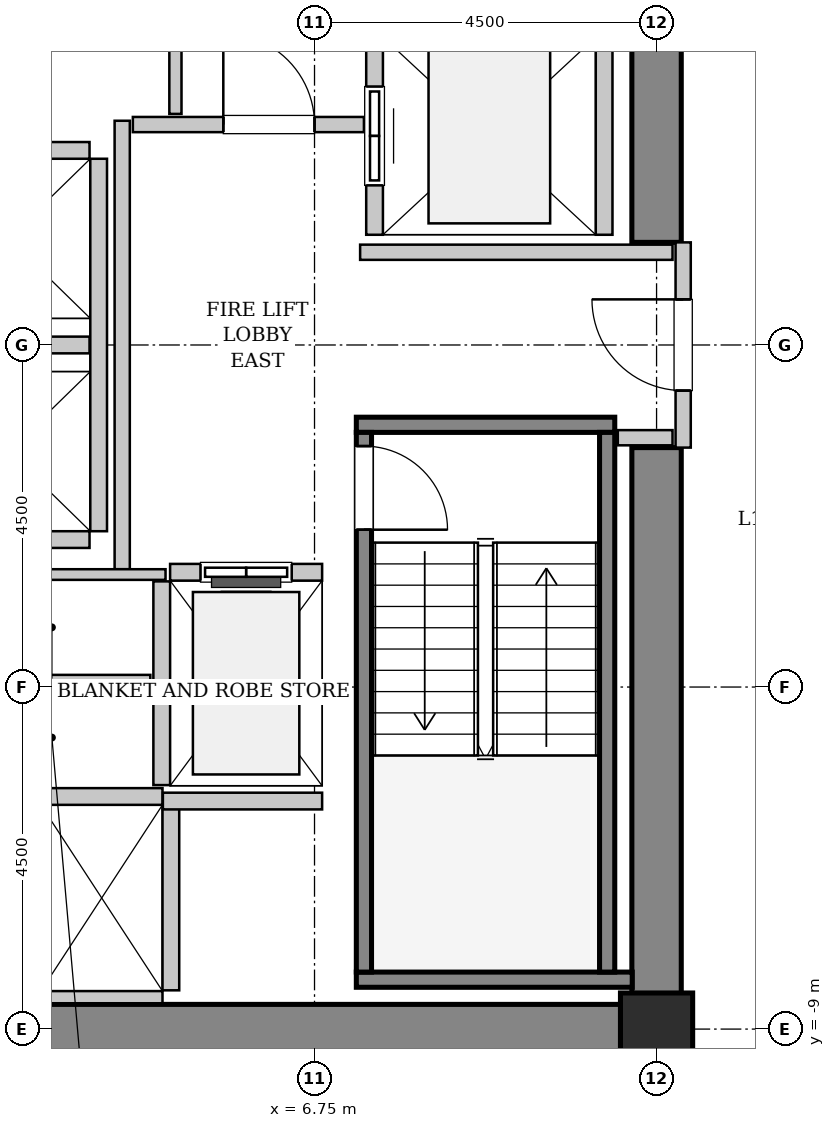
"""IFC4 building model, lengths in metres.
Left out: names, types, materials, properties, quantities, classifications, styles, units other than length and angle.
Written with IfcOpenShell. Run it as: python <this file> out.ifc"""

import sys

from ifc_helpers import new_model, si_unit, direction, frame, frame_2d, origin, origin_2d, place, context, subcontext, project, spatial, rectangle, hollow_rectangle, extrude, source, transform, mapped, element, fill, save


model = new_model("IFC4")
c1 = context("Model", 3, precision=1e-05, world=origin(), true_north=direction((0.0, 1.0)))
c2 = subcontext(c1, "Body", "Model", "MODEL_VIEW")
j1 = project(units=[si_unit("LENGTHUNIT", "METRE"), si_unit("PLANEANGLEUNIT", "RADIAN")], contexts=[c1])
p1 = place(None, origin())
s1 = spatial("IfcSite", under=j1, at=p1, CompositionType="ELEMENT")
p2 = place(p1, origin())
s2 = spatial("IfcBuilding", under=s1, at=p2, CompositionType="ELEMENT")
p3 = place(p2, frame((0.0, 0.0, 59.6)))
s3 = spatial("IfcBuildingStorey", under=s2, at=p3, CompositionType="ELEMENT", Elevation=59.6)
m1 = source(origin(), c2, "Body", "SweptSolid", [
    extrude(rectangle(XDim=10.025, YDim=0.65, at=frame_2d((5.012, 0.0))), origin(), (0.0, 0.0, 1.0), 3.8),
])
p4 = place(p3, frame((1.55, -9.0, 0.0), z_axis=(0.0, 0.0, 1.0), x_axis=(1.0, 0.0, 0.0)))
e1 = element("IfcWall", 1, at=p4, inside=s3, PredefinedType="SHEAR", context=c2, shape_type="MappedRepresentation", body=[
    mapped(m1, transform((0.0, 0.0, 0.0), x_axis=(1.0, 0.0, 0.0), y_axis=(0.0, 1.0, 0.0), z_axis=(0.0, 0.0, 1.0), scale=1.0)),
])
m2 = source(origin(), c2, "Body", "SweptSolid", [
    extrude(rectangle(XDim=7.325, YDim=0.65, at=frame_2d((3.663, 0.0))), origin(), (0.0, 0.0, 1.0), 3.8),
])
for number, where, z_axis, x_axis in (
    (2, (11.25, -8.675, 0.0), (0.0, 0.0, 1.0), (0.0, 1.0, 0.0)),
    (3, (11.25, 1.35, 0.0), (0.0, 0.0, 1.0), (0.0, 1.0, 0.0)),
):
    element("IfcWall", number, at=place(p3, frame(where, z_axis=z_axis, x_axis=x_axis)), inside=s3, PredefinedType="SHEAR", context=c2, shape_type="MappedRepresentation", body=[
        mapped(m2, transform((0.0, 0.0, 0.0), x_axis=(1.0, 0.0, 0.0), y_axis=(0.0, 1.0, 0.0), z_axis=(0.0, 0.0, 1.0), scale=1.0)),
    ])
m3 = source(origin(), c2, "Body", "SweptSolid", [
    extrude(hollow_rectangle(XDim=0.95, YDim=0.95, WallThickness=0.045, InnerFilletRadius=0.045, OuterFilletRadius=0.09, at=origin_2d()), origin(), (0.0, 0.0, 1.0), 3.8),
])
p5 = place(p3, frame((11.25, -9.0, 0.0), z_axis=(0.0, 0.0, 1.0), x_axis=(1.0, 0.0, 0.0)))
e4 = element("IfcColumn", 4, at=p5, inside=s3, PredefinedType="COLUMN", context=c2, shape_type="MappedRepresentation", body=[
    mapped(m3, transform((0.0, 0.0, 0.0), x_axis=(1.0, 0.0, 0.0), y_axis=(0.0, 1.0, 0.0), z_axis=(0.0, 0.0, 1.0), scale=1.0)),
])
m4 = source(origin(), c2, "Body", "SweptSolid", [
    extrude(rectangle(XDim=3.4, YDim=0.2, at=frame_2d((1.7, 0.0))), origin(), (0.0, 0.0, 1.0), 3.8),
])
p6 = place(p3, frame((7.3, -1.05, 0.0), z_axis=(0.0, 0.0, 1.0), x_axis=(1.0, 0.0, 0.0)))
e5 = element("IfcWall", 5, at=p6, inside=s3, PredefinedType="SOLIDWALL", context=c2, shape_type="MappedRepresentation", body=[
    mapped(m4, transform((0.0, 0.0, 0.0), x_axis=(1.0, 0.0, 0.0), y_axis=(0.0, 1.0, 0.0), z_axis=(0.0, 0.0, 1.0), scale=1.0)),
])
m5 = source(origin(), c2, "Body", "SweptSolid", [
    extrude(rectangle(XDim=3.63, YDim=0.2, at=frame_2d((1.815, 0.0))), origin(), (0.0, 0.0, 1.0), 3.8),
])
p7 = place(p3, frame((7.3, -8.35, 0.0), z_axis=(0.0, 0.0, 1.0), x_axis=(1.0, 0.0, 0.0)))
e6 = element("IfcWall", 6, at=p7, inside=s3, PredefinedType="SOLIDWALL", context=c2, shape_type="MappedRepresentation", body=[
    mapped(m5, transform((0.0, 0.0, 0.0), x_axis=(1.0, 0.0, 0.0), y_axis=(0.0, 1.0, 0.0), z_axis=(0.0, 0.0, 1.0), scale=1.0)),
])
m6 = source(origin(), c2, "Body", "SweptSolid", [
    extrude(rectangle(XDim=7.1, YDim=0.2, at=frame_2d((3.55, 0.0))), origin(), (0.0, 0.0, 1.0), 3.8),
])
p8 = place(p3, frame((7.4, -1.15, 0.0), z_axis=(0.0, 0.0, 1.0), x_axis=(0.0, -1.0, 0.0)))
e7 = element("IfcWall", 7, at=p8, inside=s3, PredefinedType="SOLIDWALL", context=c2, shape_type="MappedRepresentation", body=[
    mapped(m6, transform((0.0, 0.0, 0.0), x_axis=(1.0, 0.0, 0.0), y_axis=(0.0, 1.0, 0.0), z_axis=(0.0, 0.0, 1.0), scale=1.0)),
])
p9 = place(p8, frame((0.18, 0.0, 0.0)))
e8 = element("IfcOpeningElement", 8, at=p9, cuts=e7, PredefinedType="OPENING", context=c2, shape_type="SweptSolid", body=[
    extrude(rectangle(XDim=1.1, YDim=2.15, at=frame_2d((0.55, 1.075))), frame((0.0, 0.11, 0.0), z_axis=(0.0, -1.0, 0.0), x_axis=(1.0, 0.0, 0.0)), (0.0, 0.0, 1.0), 0.22),
])
p10 = place(p3, frame((10.6, -1.15, 0.0), z_axis=(0.0, 0.0, 1.0), x_axis=(0.0, -1.0, 0.0)))
e9 = element("IfcWall", 9, at=p10, inside=s3, PredefinedType="SOLIDWALL", context=c2, shape_type="MappedRepresentation", body=[
    mapped(m6, transform((0.0, 0.0, 0.0), x_axis=(1.0, 0.0, 0.0), y_axis=(0.0, 1.0, 0.0), z_axis=(0.0, 0.0, 1.0), scale=1.0)),
])
m7 = source(origin(), c2, "Body", "SweptSolid", [
    extrude(rectangle(XDim=2.0, YDim=0.22, at=frame_2d((1.0, 0.0))), origin(), (0.0, 0.0, 1.0), 3.535),
])
p11 = place(p3, frame((6.85, -2.99, 0.0), z_axis=(0.0, 0.0, 1.0), x_axis=(-1.0, 0.0, 0.0)))
e10 = element("IfcWall", 10, at=p11, inside=s3, PredefinedType="SOLIDWALL", context=c2, shape_type="MappedRepresentation", body=[
    mapped(m7, transform((0.0, 0.0, 0.0), x_axis=(1.0, 0.0, 0.0), y_axis=(0.0, 1.0, 0.0), z_axis=(0.0, 0.0, 1.0), scale=1.0)),
])
p12 = place(p11, frame((0.4, 0.0, 0.0)))
e11 = element("IfcOpeningElement", 11, at=p12, cuts=e10, PredefinedType="OPENING", context=c2, shape_type="SweptSolid", body=[
    extrude(rectangle(XDim=1.2, YDim=2.2, at=frame_2d((0.6, 1.1))), frame((0.0, 0.12, 0.0), z_axis=(0.0, -1.0, 0.0), x_axis=(1.0, 0.0, 0.0)), (0.0, 0.0, 1.0), 0.24),
])
m8 = source(origin(), c2, "Body", "SweptSolid", [
    extrude(rectangle(XDim=2.68, YDim=0.22, at=frame_2d((1.34, 0.0))), origin(), (0.0, 0.0, 1.0), 3.535),
])
p13 = place(p3, frame((4.74, -3.11, 0.0), z_axis=(0.0, 0.0, 1.0), x_axis=(0.0, -1.0, 0.0)))
e12 = element("IfcWall", 12, at=p13, inside=s3, PredefinedType="SOLIDWALL", context=c2, shape_type="MappedRepresentation", body=[
    mapped(m8, transform((0.0, 0.0, 0.0), x_axis=(1.0, 0.0, 0.0), y_axis=(0.0, 1.0, 0.0), z_axis=(0.0, 0.0, 1.0), scale=1.0)),
])
m9 = source(origin(), c2, "Body", "SweptSolid", [
    extrude(rectangle(XDim=5.45, YDim=0.22, at=frame_2d((2.725, 0.0))), origin(), (0.0, 0.0, 1.0), 3.535),
])
p14 = place(p3, frame((7.54, 6.9, 0.0), z_axis=(0.0, 0.0, 1.0), x_axis=(0.0, -1.0, 0.0)))
e13 = element("IfcWall", 13, at=p14, inside=s3, PredefinedType="SOLIDWALL", context=c2, shape_type="MappedRepresentation", body=[
    mapped(m9, transform((0.0, 0.0, 0.0), x_axis=(1.0, 0.0, 0.0), y_axis=(0.0, 1.0, 0.0), z_axis=(0.0, 0.0, 1.0), scale=1.0)),
])
p15 = place(p14, frame((3.5, 0.0, 0.0)))
e14 = element("IfcOpeningElement", 14, at=p15, cuts=e13, PredefinedType="OPENING", context=c2, shape_type="SweptSolid", body=[
    extrude(rectangle(XDim=1.3, YDim=2.3, at=frame_2d((0.65, 1.15))), frame((0.0, 0.12, 0.0), z_axis=(0.0, -1.0, 0.0), x_axis=(1.0, 0.0, 0.0)), (0.0, 0.0, 1.0), 0.24),
])
p16 = place(p14, frame((0.65, 0.0, 0.0)))
e15 = element("IfcOpeningElement", 15, at=p16, cuts=e13, PredefinedType="OPENING", context=c2, shape_type="SweptSolid", body=[
    extrude(rectangle(XDim=1.3, YDim=2.3, at=frame_2d((0.65, 1.15))), frame((0.0, 0.12, 0.0), z_axis=(0.0, -1.0, 0.0), x_axis=(1.0, 0.0, 0.0)), (0.0, 0.0, 1.0), 0.24),
])
p17 = place(p3, frame((10.56, 1.45, 0.0), z_axis=(0.0, 0.0, 1.0), x_axis=(0.0, 1.0, 0.0)))
e16 = element("IfcWall", 16, at=p17, inside=s3, PredefinedType="SOLIDWALL", context=c2, shape_type="MappedRepresentation", body=[
    mapped(m9, transform((0.0, 0.0, 0.0), x_axis=(1.0, 0.0, 0.0), y_axis=(0.0, 1.0, 0.0), z_axis=(0.0, 0.0, 1.0), scale=1.0)),
])
m10 = source(origin(), c2, "Body", "SweptSolid", [
    extrude(rectangle(XDim=3.2, YDim=0.22, at=frame_2d((1.6, 0.0))), origin(), (0.0, 0.0, 1.0), 3.535),
])
p18 = place(p3, frame((4.75, -5.94, 0.0), z_axis=(0.0, 0.0, 1.0), x_axis=(-1.0, 0.0, 0.0)))
e17 = element("IfcWall", 17, at=p18, inside=s3, PredefinedType="SOLIDWALL", context=c2, shape_type="MappedRepresentation", body=[
    mapped(m10, transform((0.0, 0.0, 0.0), x_axis=(1.0, 0.0, 0.0), y_axis=(0.0, 1.0, 0.0), z_axis=(0.0, 0.0, 1.0), scale=1.0)),
])
m11 = source(origin(), c2, "Body", "SweptSolid", [
    extrude(rectangle(XDim=3.2, YDim=0.16, at=frame_2d((1.6, 0.0))), origin(), (0.0, 0.0, 1.0), 2.425),
])
p19 = place(p3, frame((1.55, -8.58, 0.0), z_axis=(0.0, 0.0, 1.0), x_axis=(1.0, 0.0, 0.0)))
e18 = element("IfcWall", 18, at=p19, inside=s3, PredefinedType="PARTITIONING", context=c2, shape_type="MappedRepresentation", body=[
    mapped(m11, transform((0.0, 0.0, 0.0), x_axis=(1.0, 0.0, 0.0), y_axis=(0.0, 1.0, 0.0), z_axis=(0.0, 0.0, 1.0), scale=1.0)),
])
m12 = source(origin(), c2, "Body", "SweptSolid", [
    extrude(rectangle(XDim=2.43, YDim=0.22, at=frame_2d((1.215, 0.0))), origin(), (0.0, 0.0, 1.0), 3.535),
])
p20 = place(p3, frame((4.86, -8.49, 0.0), z_axis=(0.0, 0.0, 1.0), x_axis=(0.0, 1.0, 0.0)))
e19 = element("IfcWall", 19, at=p20, inside=s3, PredefinedType="SOLIDWALL", context=c2, shape_type="MappedRepresentation", body=[
    mapped(m12, transform((0.0, 0.0, 0.0), x_axis=(1.0, 0.0, 0.0), y_axis=(0.0, 1.0, 0.0), z_axis=(0.0, 0.0, 1.0), scale=1.0)),
])
m13 = source(origin(), c2, "Body", "SweptSolid", [
    extrude(rectangle(XDim=4.9, YDim=0.22, at=frame_2d((2.45, 0.0))), origin(), (0.0, 0.0, 1.0), 3.535),
])
p21 = place(p3, frame((3.91, -2.45, 0.0), z_axis=(0.0, 0.0, 1.0), x_axis=(0.0, 1.0, 0.0)))
e20 = element("IfcWall", 20, at=p21, inside=s3, PredefinedType="SOLIDWALL", context=c2, shape_type="MappedRepresentation", body=[
    mapped(m13, transform((0.0, 0.0, 0.0), x_axis=(1.0, 0.0, 0.0), y_axis=(0.0, 1.0, 0.0), z_axis=(0.0, 0.0, 1.0), scale=1.0)),
])
m14 = source(origin(), c2, "Body", "SweptSolid", [
    extrude(rectangle(XDim=2.13, YDim=0.22, at=frame_2d((1.065, 0.0))), origin(), (0.0, 0.0, 1.0), 3.535),
])
for number, where, z_axis, x_axis in (
    (21, (1.66, -2.56, 0.0), (0.0, 0.0, 1.0), (1.0, 0.0, 0.0)),
    (22, (1.66, 0.0, 0.0), (0.0, 0.0, 1.0), (1.0, 0.0, 0.0)),
    (23, (3.79, 2.56, 0.0), (0.0, 0.0, 1.0), (-1.0, 0.0, 0.0)),
):
    element("IfcWall", number, at=place(p3, frame(where, z_axis=z_axis, x_axis=x_axis)), inside=s3, PredefinedType="SOLIDWALL", context=c2, shape_type="MappedRepresentation", body=[
        mapped(m14, transform((0.0, 0.0, 0.0), x_axis=(1.0, 0.0, 0.0), y_axis=(0.0, 1.0, 0.0), z_axis=(0.0, 0.0, 1.0), scale=1.0)),
    ])
m15 = source(origin(), c2, "Body", "SweptSolid", [
    extrude(rectangle(XDim=2.095, YDim=0.22, at=frame_2d((1.048, 0.0))), origin(), (0.0, 0.0, 1.0), 3.535),
])
p22 = place(p3, frame((4.755, -6.0, 0.0), z_axis=(0.0, 0.0, 1.0), x_axis=(1.0, 0.0, 0.0)))
e24 = element("IfcWall", 24, at=p22, inside=s3, PredefinedType="SOLIDWALL", context=c2, shape_type="MappedRepresentation", body=[
    mapped(m15, transform((0.0, 0.0, 0.0), x_axis=(1.0, 0.0, 0.0), y_axis=(0.0, 1.0, 0.0), z_axis=(0.0, 0.0, 1.0), scale=1.0)),
])
m16 = source(origin(), c2, "Body", "SweptSolid", [
    extrude(rectangle(XDim=2.7, YDim=0.2, at=frame_2d((1.35, 0.0))), origin(), (0.0, 0.0, 1.0), 2.425),
])
p23 = place(p3, frame((11.6, -1.35, 0.0), z_axis=(0.0, 0.0, 1.0), x_axis=(0.0, 1.0, 0.0)))
e25 = element("IfcWall", 25, at=p23, inside=s3, PredefinedType="PARTITIONING", context=c2, shape_type="MappedRepresentation", body=[
    mapped(m16, transform((0.0, 0.0, 0.0), x_axis=(1.0, 0.0, 0.0), y_axis=(0.0, 1.0, 0.0), z_axis=(0.0, 0.0, 1.0), scale=1.0)),
])
p24 = place(p23, frame((0.75, 0.0, 0.0)))
e26 = element("IfcOpeningElement", 26, at=p24, cuts=e25, PredefinedType="OPENING", context=c2, shape_type="SweptSolid", body=[
    extrude(rectangle(XDim=1.2, YDim=2.15, at=frame_2d((0.6, 1.075))), frame((0.0, 0.11, 0.0), z_axis=(0.0, -1.0, 0.0), x_axis=(1.0, 0.0, 0.0)), (0.0, 0.0, 1.0), 0.22),
])
m17 = source(origin(), c2, "Body", "SweptSolid", [
    extrude(rectangle(XDim=5.9, YDim=0.2, at=frame_2d((2.95, 0.0))), origin(), (0.0, 0.0, 1.0), 3.535),
])
p25 = place(p3, frame((4.22, -2.95, 0.0), z_axis=(0.0, 0.0, 1.0), x_axis=(0.0, 1.0, 0.0)))
e27 = element("IfcWall", 27, at=p25, inside=s3, PredefinedType="PARTITIONING", context=c2, shape_type="MappedRepresentation", body=[
    mapped(m17, transform((0.0, 0.0, 0.0), x_axis=(1.0, 0.0, 0.0), y_axis=(0.0, 1.0, 0.0), z_axis=(0.0, 0.0, 1.0), scale=1.0)),
])
m18 = source(origin(), c2, "Body", "SweptSolid", [
    extrude(rectangle(XDim=3.04, YDim=0.2, at=frame_2d((1.52, 0.0))), origin(), (0.0, 0.0, 1.0), 3.535),
])
p26 = place(p3, frame((4.36, 2.9, 0.0), z_axis=(0.0, 0.0, 1.0), x_axis=(1.0, 0.0, 0.0)))
e28 = element("IfcWall", 28, at=p26, inside=s3, PredefinedType="PARTITIONING", context=c2, shape_type="MappedRepresentation", body=[
    mapped(m18, transform((0.0, 0.0, 0.0), x_axis=(1.0, 0.0, 0.0), y_axis=(0.0, 1.0, 0.0), z_axis=(0.0, 0.0, 1.0), scale=1.0)),
])
p27 = place(p26, frame((1.19, 0.0, 0.0)))
e29 = element("IfcOpeningElement", 29, at=p27, cuts=e28, PredefinedType="OPENING", context=c2, shape_type="SweptSolid", body=[
    extrude(rectangle(XDim=1.2, YDim=2.15, at=frame_2d((0.6, 1.075))), frame((0.0, 0.11, 0.0), z_axis=(0.0, -1.0, 0.0), x_axis=(1.0, 0.0, 0.0)), (0.0, 0.0, 1.0), 0.22),
])
m19 = source(origin(), c2, "Body", "SweptSolid", [
    extrude(rectangle(XDim=4.11, YDim=0.2, at=frame_2d((2.055, 0.0))), origin(), (0.0, 0.0, 1.0), 3.535),
])
p28 = place(p3, frame((7.35, 1.22, 0.0), z_axis=(0.0, 0.0, 1.0), x_axis=(1.0, 0.0, 0.0)))
e30 = element("IfcWall", 30, at=p28, inside=s3, PredefinedType="PARTITIONING", context=c2, shape_type="MappedRepresentation", body=[
    mapped(m19, transform((0.0, 0.0, 0.0), x_axis=(1.0, 0.0, 0.0), y_axis=(0.0, 1.0, 0.0), z_axis=(0.0, 0.0, 1.0), scale=1.0)),
])
m20 = source(origin(), c2, "Body", "SweptSolid", [
    extrude(rectangle(XDim=0.72, YDim=0.2, at=frame_2d((0.36, 0.0))), origin(), (0.0, 0.0, 1.0), 3.535),
])
p29 = place(p3, frame((10.74, -1.22, 0.0), z_axis=(0.0, 0.0, 1.0), x_axis=(1.0, 0.0, 0.0)))
e31 = element("IfcWall", 31, at=p29, inside=s3, PredefinedType="PARTITIONING", context=c2, shape_type="MappedRepresentation", body=[
    mapped(m20, transform((0.0, 0.0, 0.0), x_axis=(1.0, 0.0, 0.0), y_axis=(0.0, 1.0, 0.0), z_axis=(0.0, 0.0, 1.0), scale=1.0)),
])
m21 = source(origin(), c2, "Body", "SweptSolid", [
    extrude(rectangle(XDim=3.015, YDim=0.16, at=frame_2d((1.507, 0.0))), origin(), (0.0, 0.0, 1.0), 3.535),
])
p30 = place(p3, frame((4.92, 3.04, 0.0), z_axis=(0.0, 0.0, 1.0), x_axis=(0.0, 1.0, 0.0)))
e32 = element("IfcWall", 32, at=p30, inside=s3, PredefinedType="PARTITIONING", context=c2, shape_type="MappedRepresentation", body=[
    mapped(m21, transform((0.0, 0.0, 0.0), x_axis=(1.0, 0.0, 0.0), y_axis=(0.0, 1.0, 0.0), z_axis=(0.0, 0.0, 1.0), scale=1.0)),
])
m22 = source(origin(), c2, "Body", "SweptSolid", [
    extrude(rectangle(XDim=3.15, YDim=0.14, at=frame_2d((1.575, 0.0))), origin(), (0.0, 0.0, 1.0), 3.535),
])
p31 = place(p3, frame((1.64, -3.02, 0.0), z_axis=(0.0, 0.0, 1.0), x_axis=(1.0, 0.0, 0.0)))
e33 = element("IfcWall", 33, at=p31, inside=s3, PredefinedType="PARTITIONING", context=c2, shape_type="MappedRepresentation", body=[
    mapped(m22, transform((0.0, 0.0, 0.0), x_axis=(1.0, 0.0, 0.0), y_axis=(0.0, 1.0, 0.0), z_axis=(0.0, 0.0, 1.0), scale=1.0)),
])
m23 = source(origin(), c2, "Body", "SweptSolid", [
    extrude(rectangle(XDim=2.95, YDim=0.14, at=frame_2d((1.475, 0.0))), origin(), (0.0, 0.0, 1.0), 3.535),
])
p32 = place(p3, frame((1.64, -4.41, 0.0), z_axis=(0.0, 0.0, 1.0), x_axis=(1.0, 0.0, 0.0)))
e34 = element("IfcWall", 34, at=p32, inside=s3, PredefinedType="PARTITIONING", context=c2, shape_type="MappedRepresentation", body=[
    mapped(m23, transform((0.0, 0.0, 0.0), x_axis=(1.0, 0.0, 0.0), y_axis=(0.0, 1.0, 0.0), z_axis=(0.0, 0.0, 1.0), scale=1.0)),
])
m24 = source(origin(), c2, "Body", "SweptSolid", [
    extrude(rectangle(XDim=1.1, YDim=2.15, at=frame_2d((0.55, 1.075))), frame((0.0, 0.025, 0.0), z_axis=(0.0, -1.0, 0.0), x_axis=(1.0, 0.0, 0.0)), (0.0, 0.0, 1.0), 0.05),
])
p33 = place(p9, origin())
e35 = element("IfcDoor", 35, at=p33, inside=s3, OperationType="SINGLE_SWING_RIGHT", PredefinedType="DOOR", context=c2, shape_type="MappedRepresentation", body=[
    mapped(m24, transform((0.0, 0.0, 0.0), x_axis=(1.0, 0.0, 0.0), y_axis=(0.0, 1.0, 0.0), z_axis=(0.0, 0.0, 1.0), scale=1.0)),
])
fill(e8, e35)
m25 = source(origin(), c2, "Body", "SweptSolid", [
    extrude(rectangle(XDim=1.2, YDim=2.2, at=frame_2d((0.6, 1.1))), frame((0.0, 0.025, 0.0), z_axis=(0.0, -1.0, 0.0), x_axis=(1.0, 0.0, 0.0)), (0.0, 0.0, 1.0), 0.05),
])
p34 = place(p12, origin())
e36 = element("IfcDoor", 36, at=p34, inside=s3, OperationType="SLIDING_TO_LEFT", PredefinedType="DOOR", context=c2, shape_type="MappedRepresentation", body=[
    mapped(m25, transform((0.0, 0.0, 0.0), x_axis=(1.0, 0.0, 0.0), y_axis=(0.0, 1.0, 0.0), z_axis=(0.0, 0.0, 1.0), scale=1.0)),
])
fill(e11, e36)
m26 = source(origin(), c2, "Body", "SweptSolid", [
    extrude(rectangle(XDim=1.3, YDim=2.3, at=frame_2d((0.65, 1.15))), frame((0.0, 0.025, 0.0), z_axis=(0.0, -1.0, 0.0), x_axis=(1.0, 0.0, 0.0)), (0.0, 0.0, 1.0), 0.05),
])
p35 = place(p15, origin())
e37 = element("IfcDoor", 37, at=p35, inside=s3, OperationType="SLIDING_TO_RIGHT", PredefinedType="DOOR", context=c2, shape_type="MappedRepresentation", body=[
    mapped(m26, transform((0.0, 0.0, 0.0), x_axis=(1.0, 0.0, 0.0), y_axis=(0.0, 1.0, 0.0), z_axis=(0.0, 0.0, 1.0), scale=1.0)),
])
fill(e14, e37)
m27 = source(origin(), c2, "Body", "SweptSolid", [
    extrude(rectangle(XDim=1.2, YDim=2.15, at=frame_2d((0.6, 1.075))), frame((0.0, 0.025, 0.0), z_axis=(0.0, -1.0, 0.0), x_axis=(1.0, 0.0, 0.0)), (0.0, 0.0, 1.0), 0.05),
])
p36 = place(p24, origin())
e38 = element("IfcDoor", 38, at=p36, inside=s3, OperationType="SINGLE_SWING_RIGHT", PredefinedType="DOOR", context=c2, shape_type="MappedRepresentation", body=[
    mapped(m27, transform((0.0, 0.0, 0.0), x_axis=(1.0, 0.0, 0.0), y_axis=(0.0, 1.0, 0.0), z_axis=(0.0, 0.0, 1.0), scale=1.0)),
])
fill(e26, e38)
p37 = place(p27, origin())
e39 = element("IfcDoor", 39, at=p37, inside=s3, OperationType="SINGLE_SWING_LEFT", PredefinedType="DOOR", context=c2, shape_type="MappedRepresentation", body=[
    mapped(m27, transform((0.0, 0.0, 0.0), x_axis=(1.0, 0.0, 0.0), y_axis=(0.0, 1.0, 0.0), z_axis=(0.0, 0.0, 1.0), scale=1.0)),
])
fill(e29, e39)
save(model, sys.argv[1])
